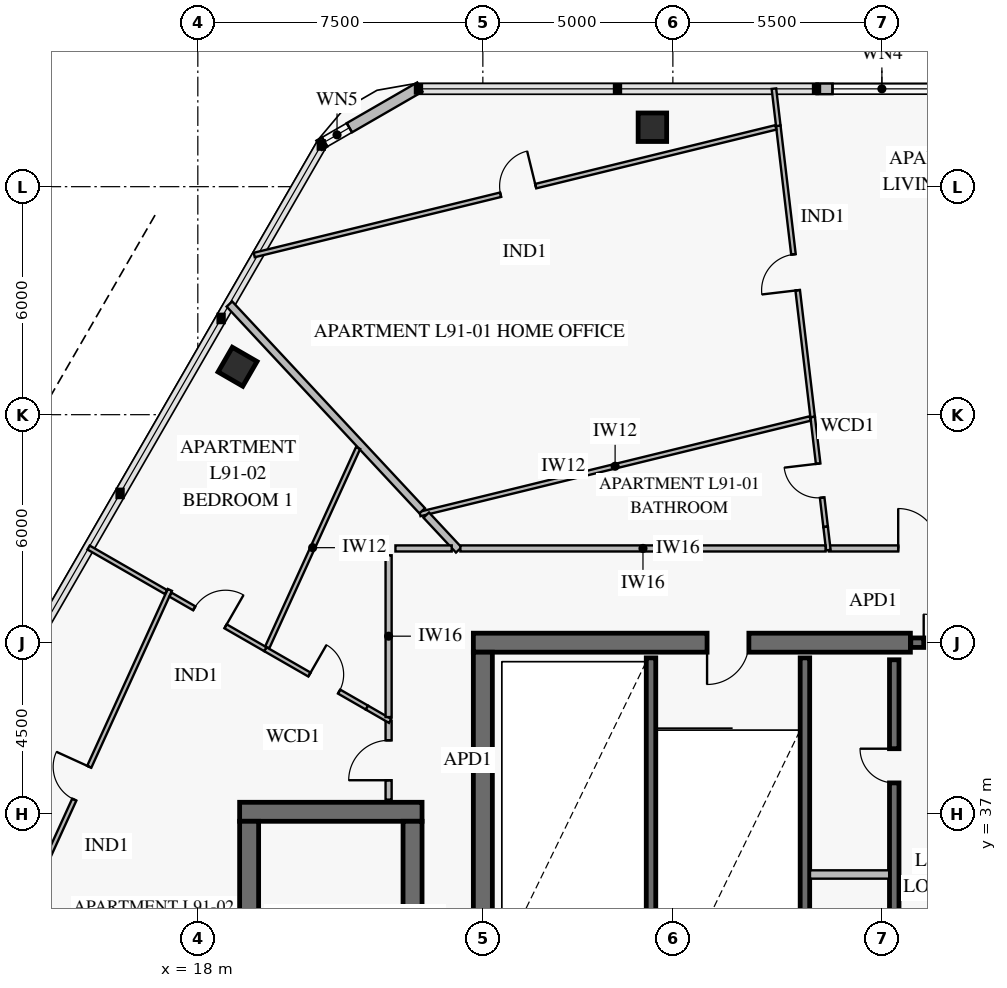
"""IFC4 building model, lengths in metres.
Left out: names, types, materials, properties, quantities, classifications, styles, units other than length and angle.
Written with IfcOpenShell. Run it as: python <this file> out.ifc"""

import sys

from ifc_helpers import new_model, si_unit, direction, frame, frame_2d, origin, origin_2d, place, context, subcontext, project, spatial, rectangle, extrude, element, fill, save


model = new_model("IFC4")
c1 = context("Model", 3, precision=1e-05, world=origin(), true_north=direction((0.0, 1.0)))
c2 = subcontext(c1, "Body", "Model", "MODEL_VIEW")
j1 = project(units=[si_unit("LENGTHUNIT", "METRE"), si_unit("PLANEANGLEUNIT", "RADIAN")], contexts=[c1])
p1 = place(None, origin())
s1 = spatial("IfcSite", under=j1, at=p1, CompositionType="ELEMENT")
p2 = place(p1, origin())
s2 = spatial("IfcBuilding", under=s1, at=p2, CompositionType="ELEMENT")
p3 = place(p2, frame((0.0, 0.0, 357.6)))
s3 = spatial("IfcBuildingStorey", under=s2, at=p3, CompositionType="ELEMENT", Elevation=357.6)
p4 = place(p3, frame((36.75, 41.5, 0.0), z_axis=(0.0, 0.0, 1.0), x_axis=(-1.0, 0.0, 0.0)))
e1 = element("IfcWall", 1, at=p4, inside=s3, PredefinedType="SHEAR", context=c2, shape_type="SweptSolid", body=[
    extrude(rectangle(XDim=11.5, YDim=0.5, at=frame_2d((5.75, 0.0))), origin(), (0.0, 0.0, 1.0), 3.8),
])
p5 = place(p4, frame((4.25, 0.0, 0.0)))
e2 = element("IfcOpeningElement", 2, at=p5, cuts=e1, PredefinedType="OPENING", context=c2, shape_type="SweptSolid", body=[
    extrude(rectangle(XDim=1.1, YDim=2.15, at=frame_2d((0.55, 1.075))), frame((0.0, 0.262, 0.0), z_axis=(0.0, -1.0, 0.0), x_axis=(1.0, 0.0, 0.0)), (0.0, 0.0, 1.0), 0.524),
])
p6 = place(p3, frame((25.5, 22.75, 0.0), z_axis=(0.0, 0.0, 1.0), x_axis=(0.0, 1.0, 0.0)))
e3 = element("IfcWall", 3, at=p6, inside=s3, PredefinedType="SHEAR", context=c2, shape_type="SweptSolid", body=[
    extrude(rectangle(XDim=18.5, YDim=0.5, at=frame_2d((9.25, 0.0))), origin(), (0.0, 0.0, 1.0), 3.8),
])
p7 = place(p6, frame((9.0, 0.0, 0.0)))
e4 = element("IfcOpeningElement", 4, at=p7, cuts=e3, PredefinedType="OPENING", context=c2, shape_type="SweptSolid", body=[
    extrude(rectangle(XDim=1.1, YDim=2.15, at=frame_2d((0.55, 1.075))), frame((0.0, 0.262, 0.0), z_axis=(0.0, -1.0, 0.0), x_axis=(1.0, 0.0, 0.0)), (0.0, 0.0, 1.0), 0.524),
])
for number, where, z_axis, x_axis in (
    (5, (29.961, 55.064, 0.0), (0.0, 0.0, 1.0), (-1.0, 0.0, 0.0)),
    (6, (19.045, 48.762, 0.0), (0.0, 0.0, 1.0), (-0.5, -0.866, 0.0)),
):
    element("IfcColumn", number, at=place(p3, frame(where, z_axis=z_axis, x_axis=x_axis)), inside=s3, PredefinedType="COLUMN", context=c2, shape_type="SweptSolid", body=[
        extrude(rectangle(XDim=0.75, YDim=0.75, at=origin_2d()), origin(), (0.0, 0.0, 1.0), 3.35),
    ])
p8 = place(p3, frame((23.9, 37.05, 0.0), z_axis=(0.0, 0.0, 1.0), x_axis=(-1.0, 0.0, 0.0)))
e7 = element("IfcWall", 7, at=p8, inside=s3, PredefinedType="SHEAR", context=c2, shape_type="SweptSolid", body=[
    extrude(rectangle(XDim=4.8, YDim=0.5, at=frame_2d((2.4, 0.0))), origin(), (0.0, 0.0, 1.0), 3.8),
])
for number, where, z_axis, x_axis in (
    (8, (19.35, 27.2, 0.0), (0.0, 0.0, 1.0), (0.0, 1.0, 0.0)),
    (9, (23.65, 36.8, 0.0), (0.0, 0.0, 1.0), (0.0, -1.0, 0.0)),
):
    element("IfcWall", number, at=place(p3, frame(where, z_axis=z_axis, x_axis=x_axis)), inside=s3, PredefinedType="SHEAR", context=c2, shape_type="SweptSolid", body=[
        extrude(rectangle(XDim=9.6, YDim=0.5, at=frame_2d((4.8, 0.0))), origin(), (0.0, 0.0, 1.0), 3.8),
    ])
p9 = place(p3, frame((21.189, 54.589, 0.0), z_axis=(0.0, 0.0, 1.0), x_axis=(0.866023752521, 0.50000286006, 0.0)))
e10 = element("IfcWall", 10, at=p9, inside=s3, PredefinedType="SOLIDWALL", context=c2, shape_type="SweptSolid", body=[
    extrude(rectangle(XDim=3.065, YDim=0.28, at=frame_2d((1.532, 0.0))), origin(), (0.0, 0.0, 1.0), 3.35),
])
p10 = place(p9, frame((0.173, 0.0, 0.85)))
e11 = element("IfcOpeningElement", 11, at=p10, cuts=e10, PredefinedType="OPENING", context=c2, shape_type="SweptSolid", body=[
    extrude(rectangle(XDim=0.75, YDim=1.5, at=frame_2d((0.375, 0.75))), frame((0.0, 0.152, 0.0), z_axis=(0.0, -1.0, 0.0), x_axis=(1.0, 0.0, 0.0)), (0.0, 0.0, 1.0), 0.304),
])
p11 = place(p3, frame((34.28, 56.074, 0.0), z_axis=(0.0, 0.0, 1.0), x_axis=(1.0, 0.0, 0.0)))
e12 = element("IfcWall", 12, at=p11, inside=s3, PredefinedType="SOLIDWALL", context=c2, shape_type="SweptSolid", body=[
    extrude(rectangle(XDim=3.44, YDim=0.28, at=frame_2d((1.72, 0.0))), origin(), (0.0, 0.0, 1.0), 3.35),
])
p12 = place(p11, frame((0.42, 0.0, 0.7)))
e13 = element("IfcOpeningElement", 13, at=p12, cuts=e12, PredefinedType="OPENING", context=c2, shape_type="SweptSolid", body=[
    extrude(rectangle(XDim=2.6, YDim=1.8, at=frame_2d((1.3, 0.9))), frame((0.0, 0.152, 0.0), z_axis=(0.0, -1.0, 0.0), x_axis=(1.0, 0.0, 0.0)), (0.0, 0.0, 1.0), 0.304),
])
p13 = place(p3, frame((36.76, 41.5, 0.0), z_axis=(0.0, 0.0, 1.0), x_axis=(1.0, 0.0, 0.0)))
e14 = element("IfcWall", 14, at=p13, inside=s3, PredefinedType="SOLIDWALL", context=c2, shape_type="SweptSolid", body=[
    extrude(rectangle(XDim=2.18, YDim=0.25, at=frame_2d((1.09, 0.0))), origin(), (0.0, 0.0, 1.0), 3.8),
])
p14 = place(p13, frame((0.34, 0.0, 0.0)))
e15 = element("IfcOpeningElement", 15, at=p14, cuts=e14, PredefinedType="OPENING", context=c2, shape_type="SweptSolid", body=[
    extrude(rectangle(XDim=1.5, YDim=2.15, at=frame_2d((0.75, 1.075))), frame((0.0, 0.137, 0.0), z_axis=(0.0, -1.0, 0.0), x_axis=(1.0, 0.0, 0.0)), (0.0, 0.0, 1.0), 0.274),
])
for number, where, z_axis, x_axis in (
    (16, (29.925, 31.4, 0.0), (0.0, 0.0, 1.0), (0.0, 1.0, 0.0)),
    (17, (33.975, 31.4, 0.0), (0.0, 0.0, 1.0), (0.0, 1.0, 0.0)),
):
    element("IfcWall", number, at=place(p3, frame(where, z_axis=z_axis, x_axis=x_axis)), inside=s3, PredefinedType="SOLIDWALL", context=c2, shape_type="SweptSolid", body=[
        extrude(rectangle(XDim=9.7, YDim=0.25, at=frame_2d((4.85, 0.0))), origin(), (0.0, 0.0, 1.0), 3.8),
    ])
p15 = place(p3, frame((36.325, 31.4, 0.0), z_axis=(0.0, 0.0, 1.0), x_axis=(0.0, 1.0, 0.0)))
e18 = element("IfcWall", 18, at=p15, inside=s3, PredefinedType="SOLIDWALL", context=c2, shape_type="SweptSolid", body=[
    extrude(rectangle(XDim=9.65, YDim=0.25, at=frame_2d((4.825, 0.0))), origin(), (0.0, 0.0, 1.0), 3.8),
])
p16 = place(p15, frame((1.49, 0.0, 0.0)))
e19 = element("IfcOpeningElement", 19, at=p16, cuts=e18, PredefinedType="OPENING", context=c2, shape_type="SweptSolid", body=[
    extrude(rectangle(XDim=0.9, YDim=2.1, at=frame_2d((0.45, 1.05))), frame((0.0, 0.137, 0.0), z_axis=(0.0, -1.0, 0.0), x_axis=(1.0, 0.0, 0.0)), (0.0, 0.0, 1.0), 0.274),
])
p17 = place(p15, frame((6.41, 0.0, 0.0)))
e20 = element("IfcOpeningElement", 20, at=p17, cuts=e18, PredefinedType="OPENING", context=c2, shape_type="SweptSolid", body=[
    extrude(rectangle(XDim=0.9, YDim=2.1, at=frame_2d((0.45, 1.05))), frame((0.0, 0.137, 0.0), z_axis=(0.0, -1.0, 0.0), x_axis=(1.0, 0.0, 0.0)), (0.0, 0.0, 1.0), 0.274),
])
p18 = place(p3, frame((34.519, 44.55, 0.0), z_axis=(0.0, 0.0, 1.0), x_axis=(-0.117167277632, 0.993112193588, 0.0)))
e21 = element("IfcWall", 21, at=p18, inside=s3, PredefinedType="PARTITIONING", context=c2, shape_type="SweptSolid", body=[
    extrude(rectangle(XDim=2.911, YDim=0.12, at=frame_2d((1.456, 0.0))), origin(), (0.0, 0.0, 1.0), 3.35),
])
p19 = place(p18, frame((0.773, 0.0, 0.0)))
e22 = element("IfcOpeningElement", 22, at=p19, cuts=e21, PredefinedType="OPENING", context=c2, shape_type="SweptSolid", body=[
    extrude(rectangle(XDim=0.9, YDim=2.1, at=frame_2d((0.45, 1.05))), frame((0.0, 0.072, 0.0), z_axis=(0.0, -1.0, 0.0), x_axis=(1.0, 0.0, 0.0)), (0.0, 0.0, 1.0), 0.144),
])
p20 = place(p3, frame((34.178, 47.441, 0.0), z_axis=(0.0, 0.0, 1.0), x_axis=(-0.11719932595, 0.993108412006, 0.0)))
e23 = element("IfcWall", 23, at=p20, inside=s3, PredefinedType="PARTITIONING", context=c2, shape_type="SweptSolid", body=[
    extrude(rectangle(XDim=7.714, YDim=0.12, at=frame_2d((3.857, 0.0))), origin(), (0.0, 0.0, 1.0), 2.77),
])
p21 = place(p20, frame((3.357, 0.0, 0.0)))
e24 = element("IfcOpeningElement", 24, at=p21, cuts=e23, PredefinedType="OPENING", context=c2, shape_type="SweptSolid", body=[
    extrude(rectangle(XDim=0.95, YDim=2.1, at=frame_2d((0.475, 1.05))), frame((0.0, 0.072, 0.0), z_axis=(0.0, -1.0, 0.0), x_axis=(1.0, 0.0, 0.0)), (0.0, 0.0, 1.0), 0.144),
])
p22 = place(p3, frame((33.21, 55.06, 0.0), z_axis=(0.0, 0.0, 1.0), x_axis=(-0.971340795698, -0.237691099145, 0.0)))
e25 = element("IfcWall", 25, at=p22, inside=s3, PredefinedType="PARTITIONING", context=c2, shape_type="SweptSolid", body=[
    extrude(rectangle(XDim=14.131, YDim=0.12, at=frame_2d((7.066, 0.0))), origin(), (0.0, 0.0, 1.0), 2.77),
])
p23 = place(p22, frame((6.506, 0.0, 0.0)))
e26 = element("IfcOpeningElement", 26, at=p23, cuts=e25, PredefinedType="OPENING", context=c2, shape_type="SweptSolid", body=[
    extrude(rectangle(XDim=0.95, YDim=2.1, at=frame_2d((0.475, 1.05))), frame((0.0, 0.072, 0.0), z_axis=(0.0, -1.0, 0.0), x_axis=(1.0, 0.0, 0.0)), (0.0, 0.0, 1.0), 0.144),
])
p24 = place(p3, frame((39.302, 43.98, 0.0), z_axis=(0.0, 0.0, 1.0), x_axis=(-1.0, 0.0, 0.0)))
e27 = element("IfcWall", 27, at=p24, inside=s3, PredefinedType="PARTITIONING", context=c2, shape_type="SweptSolid", body=[
    extrude(rectangle(XDim=4.695, YDim=0.16, at=frame_2d((2.348, 0.0))), origin(), (0.0, 0.0, 1.0), 2.8),
])
p25 = place(p24, frame((1.823, 0.0, 0.0)))
e28 = element("IfcOpeningElement", 28, at=p25, cuts=e27, PredefinedType="OPENING", context=c2, shape_type="SweptSolid", body=[
    extrude(rectangle(XDim=1.05, YDim=2.15, at=frame_2d((0.525, 1.075))), frame((0.0, 0.092, 0.0), z_axis=(0.0, -1.0, 0.0), x_axis=(1.0, 0.0, 0.0)), (0.0, 0.0, 1.0), 0.184),
])
p26 = place(p3, frame((17.264, 42.889, 0.0), z_axis=(0.0, 0.0, 1.0), x_axis=(-0.41468959687, -0.909962932348, 0.0)))
e29 = element("IfcWall", 29, at=p26, inside=s3, PredefinedType="PARTITIONING", context=c2, shape_type="SweptSolid", body=[
    extrude(rectangle(XDim=11.179, YDim=0.12, at=frame_2d((5.59, 0.0))), origin(), (0.0, 0.0, 1.0), 2.77),
])
p27 = place(p26, frame((5.115, 0.0, 0.0)))
e30 = element("IfcOpeningElement", 30, at=p27, cuts=e29, PredefinedType="OPENING", context=c2, shape_type="SweptSolid", body=[
    extrude(rectangle(XDim=0.95, YDim=2.1, at=frame_2d((0.475, 1.05))), frame((0.0, 0.072, 0.0), z_axis=(0.0, -1.0, 0.0), x_axis=(1.0, 0.0, 0.0)), (0.0, 0.0, 1.0), 0.144),
])
p28 = place(p3, frame((22.45, 39.792, 0.0), z_axis=(0.0, 0.0, 1.0), x_axis=(-0.86689518328, 0.498490462502, 0.0)))
e31 = element("IfcWall", 31, at=p28, inside=s3, PredefinedType="PARTITIONING", context=c2, shape_type="SweptSolid", body=[
    extrude(rectangle(XDim=3.083, YDim=0.12, at=frame_2d((1.542, 0.0))), origin(), (0.0, 0.0, 1.0), 3.35),
])
p29 = place(p28, frame((0.845, 0.0, 0.0)))
e32 = element("IfcOpeningElement", 32, at=p29, cuts=e31, PredefinedType="OPENING", context=c2, shape_type="SweptSolid", body=[
    extrude(rectangle(XDim=0.9, YDim=2.1, at=frame_2d((0.45, 1.05))), frame((0.0, 0.072, 0.0), z_axis=(0.0, -1.0, 0.0), x_axis=(1.0, 0.0, 0.0)), (0.0, 0.0, 1.0), 0.144),
])
p30 = place(p3, frame((19.777, 41.329, 0.0), z_axis=(0.0, 0.0, 1.0), x_axis=(-0.86688797535, 0.498502997176, 0.0)))
e33 = element("IfcWall", 33, at=p30, inside=s3, PredefinedType="PARTITIONING", context=c2, shape_type="SweptSolid", body=[
    extrude(rectangle(XDim=2.878, YDim=0.12, at=frame_2d((1.439, 0.0))), origin(), (0.0, 0.0, 1.0), 3.35),
])
p31 = place(p30, frame((1.208, 0.0, 0.0)))
e34 = element("IfcOpeningElement", 34, at=p31, cuts=e33, PredefinedType="OPENING", context=c2, shape_type="SweptSolid", body=[
    extrude(rectangle(XDim=0.95, YDim=2.1, at=frame_2d((0.475, 1.05))), frame((0.0, 0.072, 0.0), z_axis=(0.0, -1.0, 0.0), x_axis=(1.0, 0.0, 0.0)), (0.0, 0.0, 1.0), 0.144),
])
p32 = place(p3, frame((17.163, 42.832, 0.0), z_axis=(0.0, 0.0, 1.0), x_axis=(-0.866878245801, 0.498519916309, 0.0)))
e35 = element("IfcWall", 35, at=p32, inside=s3, PredefinedType="PARTITIONING", context=c2, shape_type="SweptSolid", body=[
    extrude(rectangle(XDim=2.35, YDim=0.12, at=frame_2d((1.175, 0.0))), origin(), (0.0, 0.0, 1.0), 2.77),
])
p33 = place(p3, frame((23.02, 39.441, 0.0), z_axis=(0.0, 0.0, 1.0), x_axis=(0.0, -1.0, 0.0)))
e36 = element("IfcWall", 36, at=p33, inside=s3, PredefinedType="PARTITIONING", context=c2, shape_type="SweptSolid", body=[
    extrude(rectangle(XDim=2.071, YDim=0.16, at=frame_2d((1.035, 0.0))), origin(), (0.0, 0.0, 1.0), 3.35),
])
p34 = place(p33, frame((0.51, 0.0, 0.0)))
e37 = element("IfcOpeningElement", 37, at=p34, cuts=e36, PredefinedType="OPENING", context=c2, shape_type="SweptSolid", body=[
    extrude(rectangle(XDim=1.05, YDim=2.15, at=frame_2d((0.525, 1.075))), frame((0.0, 0.092, 0.0), z_axis=(0.0, -1.0, 0.0), x_axis=(1.0, 0.0, 0.0)), (0.0, 0.0, 1.0), 0.184),
])
p35 = place(p3, frame((34.108, 35.4, 0.0), z_axis=(0.0, 0.0, 1.0), x_axis=(1.0, 0.0, 0.0)))
e38 = element("IfcWall", 38, at=p35, inside=s3, PredefinedType="PARTITIONING", context=c2, shape_type="SweptSolid", body=[
    extrude(rectangle(XDim=2.084, YDim=0.22, at=frame_2d((1.042, 0.0))), origin(), (0.0, 0.0, 1.0), 3.35),
])
p36 = place(p3, frame((34.592, 43.935, 0.0), z_axis=(0.0, 0.0, 1.0), x_axis=(-0.117138729821, 0.993115561239, 0.0)))
e39 = element("IfcWall", 39, at=p36, inside=s3, PredefinedType="PARTITIONING", context=c2, shape_type="SweptSolid", body=[
    extrude(rectangle(XDim=0.619, YDim=0.12, at=frame_2d((0.31, 0.0))), origin(), (0.0, 0.0, 1.0), 3.35),
])
p37 = place(p3, frame((33.274, 55.102, 0.0), z_axis=(0.0, 0.0, 1.0), x_axis=(-0.117071500169, 0.99312348872, 0.0)))
e40 = element("IfcWall", 40, at=p37, inside=s3, PredefinedType="PARTITIONING", context=c2, shape_type="SweptSolid", body=[
    extrude(rectangle(XDim=0.984, YDim=0.12, at=frame_2d((0.492, 0.0))), origin(), (0.0, 0.0, 1.0), 2.77),
])
p38 = place(p3, frame((34.114, 47.4, 0.0), z_axis=(0.0, 0.0, 1.0), x_axis=(-0.97134085317, -0.237690864282, 0.0)))
e41 = element("IfcWall", 41, at=p38, inside=s3, PredefinedType="PARTITIONING", context=c2, shape_type="SweptSolid", body=[
    extrude(rectangle(XDim=10.571, YDim=0.12, at=frame_2d((5.286, 0.0))), origin(), (0.0, 0.0, 1.0), 2.8),
])
p39 = place(p3, frame((24.866, 43.94, 0.0), z_axis=(0.0, 0.0, 1.0), x_axis=(-0.68185345298, 0.731488802826, 0.0)))
e42 = element("IfcWall", 42, at=p39, inside=s3, PredefinedType="PARTITIONING", context=c2, shape_type="SweptSolid", body=[
    extrude(rectangle(XDim=1.254, YDim=0.2, at=frame_2d((0.627, 0.0))), origin(), (0.0, 0.0, 1.0), 3.35),
])
p40 = place(p3, frame((23.904, 44.971, 0.0), z_axis=(0.0, 0.0, 1.0), x_axis=(-0.681993072999, 0.73135863185, 0.0)))
e43 = element("IfcWall", 43, at=p40, inside=s3, PredefinedType="PARTITIONING", context=c2, shape_type="SweptSolid", body=[
    extrude(rectangle(XDim=7.438, YDim=0.2, at=frame_2d((3.719, 0.0))), origin(), (0.0, 0.0, 1.0), 2.77),
])
p41 = place(p3, frame((23.06, 39.441, 0.0), z_axis=(0.0, 0.0, 1.0), x_axis=(-0.867044954431, 0.498229913791, 0.0)))
e44 = element("IfcWall", 44, at=p41, inside=s3, PredefinedType="PARTITIONING", context=c2, shape_type="SweptSolid", body=[
    extrude(rectangle(XDim=0.704, YDim=0.12, at=frame_2d((0.352, 0.0))), origin(), (0.0, 0.0, 1.0), 3.35),
])
p42 = place(p3, frame((22.217, 46.622, 0.0), z_axis=(0.0, 0.0, 1.0), x_axis=(-0.414709230253, -0.909953984739, 0.0)))
e45 = element("IfcWall", 45, at=p42, inside=s3, PredefinedType="PARTITIONING", context=c2, shape_type="SweptSolid", body=[
    extrude(rectangle(XDim=5.763, YDim=0.12, at=frame_2d((2.881, 0.0))), origin(), (0.0, 0.0, 1.0), 2.8),
])
p43 = place(p3, frame((34.518, 43.98, 0.0), z_axis=(0.0, 0.0, 1.0), x_axis=(-1.0, 0.0, 0.0)))
e46 = element("IfcWall", 46, at=p43, inside=s3, PredefinedType="PARTITIONING", context=c2, shape_type="SweptSolid", body=[
    extrude(rectangle(XDim=9.609, YDim=0.16, at=frame_2d((4.805, 0.0))), origin(), (0.0, 0.0, 1.0), 2.8),
])
p44 = place(p3, frame((23.02, 43.8, 0.0), z_axis=(0.0, 0.0, 1.0), x_axis=(0.0, -1.0, 0.0)))
e47 = element("IfcWall", 47, at=p44, inside=s3, PredefinedType="PARTITIONING", context=c2, shape_type="SweptSolid", body=[
    extrude(rectangle(XDim=4.258, YDim=0.16, at=frame_2d((2.129, 0.0))), origin(), (0.0, 0.0, 1.0), 3.35),
])
p45 = place(p3, frame((24.681, 43.98, 0.0), z_axis=(0.0, 0.0, 1.0), x_axis=(-1.0, 0.0, 0.0)))
e48 = element("IfcWall", 48, at=p45, inside=s3, PredefinedType="PARTITIONING", context=c2, shape_type="SweptSolid", body=[
    extrude(rectangle(XDim=1.481, YDim=0.16, at=frame_2d((0.74, 0.0))), origin(), (0.0, 0.0, 1.0), 2.8),
])
p46 = place(p10, origin())
e49 = element("IfcWindow", 49, at=p46, inside=s3, PartitioningType="SINGLE_PANEL", PredefinedType="WINDOW", context=c2, shape_type="SweptSolid", body=[
    extrude(rectangle(XDim=0.75, YDim=1.5, at=frame_2d((0.375, 0.75))), frame((0.0, 0.03, 0.0), z_axis=(0.0, -1.0, 0.0), x_axis=(1.0, 0.0, 0.0)), (0.0, 0.0, 1.0), 0.06),
])
fill(e11, e49)
p47 = place(p12, origin())
e50 = element("IfcWindow", 50, at=p47, inside=s3, PartitioningType="SINGLE_PANEL", PredefinedType="WINDOW", context=c2, shape_type="SweptSolid", body=[
    extrude(rectangle(XDim=2.6, YDim=1.8, at=frame_2d((1.3, 0.9))), frame((0.0, 0.03, 0.0), z_axis=(0.0, -1.0, 0.0), x_axis=(1.0, 0.0, 0.0)), (0.0, 0.0, 1.0), 0.06),
])
fill(e13, e50)
p48 = place(p5, origin())
e51 = element("IfcDoor", 51, at=p48, inside=s3, OperationType="SINGLE_SWING_RIGHT", PredefinedType="USERDEFINED", context=c2, shape_type="SweptSolid", body=[
    extrude(rectangle(XDim=1.1, YDim=2.15, at=frame_2d((0.55, 1.075))), frame((0.0, 0.025, 0.0), z_axis=(0.0, -1.0, 0.0), x_axis=(1.0, 0.0, 0.0)), (0.0, 0.0, 1.0), 0.05),
])
fill(e2, e51)
p49 = place(p14, origin())
e52 = element("IfcDoor", 52, at=p49, inside=s3, OperationType="DOUBLE_DOOR_SINGLE_SWING", PredefinedType="DOOR", context=c2, shape_type="SweptSolid", body=[
    extrude(rectangle(XDim=1.5, YDim=2.15, at=frame_2d((0.75, 1.075))), frame((0.0, 0.025, 0.0), z_axis=(0.0, -1.0, 0.0), x_axis=(1.0, 0.0, 0.0)), (0.0, 0.0, 1.0), 0.05),
])
fill(e15, e52)
p50 = place(p17, origin())
e53 = element("IfcDoor", 53, at=p50, inside=s3, OperationType="SINGLE_SWING_RIGHT", PredefinedType="DOOR", context=c2, shape_type="SweptSolid", body=[
    extrude(rectangle(XDim=0.9, YDim=2.1, at=frame_2d((0.45, 1.05))), frame((0.0, 0.025, 0.0), z_axis=(0.0, -1.0, 0.0), x_axis=(1.0, 0.0, 0.0)), (0.0, 0.0, 1.0), 0.05),
])
fill(e20, e53)
p51 = place(p19, origin())
e54 = element("IfcDoor", 54, at=p51, inside=s3, OperationType="SINGLE_SWING_RIGHT", PredefinedType="DOOR", context=c2, shape_type="SweptSolid", body=[
    extrude(rectangle(XDim=0.9, YDim=2.1, at=frame_2d((0.45, 1.05))), frame((0.0, 0.025, 0.0), z_axis=(0.0, -1.0, 0.0), x_axis=(1.0, 0.0, 0.0)), (0.0, 0.0, 1.0), 0.05),
])
fill(e22, e54)
p52 = place(p21, origin())
e55 = element("IfcDoor", 55, at=p52, inside=s3, OperationType="SINGLE_SWING_LEFT", PredefinedType="DOOR", context=c2, shape_type="SweptSolid", body=[
    extrude(rectangle(XDim=0.95, YDim=2.1, at=frame_2d((0.475, 1.05))), frame((0.0, 0.025, 0.0), z_axis=(0.0, -1.0, 0.0), x_axis=(1.0, 0.0, 0.0)), (0.0, 0.0, 1.0), 0.05),
])
fill(e24, e55)
p53 = place(p23, frame((0.95, 0.0, 0.0), z_axis=(0.0, 0.0, 1.0), x_axis=(-1.0, 0.0, 0.0)))
e56 = element("IfcDoor", 56, at=p53, inside=s3, OperationType="SINGLE_SWING_RIGHT", PredefinedType="DOOR", context=c2, shape_type="SweptSolid", body=[
    extrude(rectangle(XDim=0.95, YDim=2.1, at=frame_2d((0.475, 1.05))), frame((0.0, 0.025, 0.0), z_axis=(0.0, -1.0, 0.0), x_axis=(1.0, 0.0, 0.0)), (0.0, 0.0, 1.0), 0.05),
])
fill(e26, e56)
p54 = place(p25, frame((1.05, 0.0, 0.0), z_axis=(0.0, 0.0, 1.0), x_axis=(-1.0, 0.0, 0.0)))
e57 = element("IfcDoor", 57, at=p54, inside=s3, OperationType="SINGLE_SWING_LEFT", PredefinedType="DOOR", context=c2, shape_type="SweptSolid", body=[
    extrude(rectangle(XDim=1.05, YDim=2.15, at=frame_2d((0.525, 1.075))), frame((0.0, 0.025, 0.0), z_axis=(0.0, -1.0, 0.0), x_axis=(1.0, 0.0, 0.0)), (0.0, 0.0, 1.0), 0.05),
])
fill(e28, e57)
p55 = place(p27, frame((0.95, 0.0, 0.0), z_axis=(0.0, 0.0, 1.0), x_axis=(-1.0, 0.0, 0.0)))
e58 = element("IfcDoor", 58, at=p55, inside=s3, OperationType="SINGLE_SWING_RIGHT", PredefinedType="DOOR", context=c2, shape_type="SweptSolid", body=[
    extrude(rectangle(XDim=0.95, YDim=2.1, at=frame_2d((0.475, 1.05))), frame((0.0, 0.025, 0.0), z_axis=(0.0, -1.0, 0.0), x_axis=(1.0, 0.0, 0.0)), (0.0, 0.0, 1.0), 0.05),
])
fill(e30, e58)
p56 = place(p29, frame((0.9, 0.0, 0.0), z_axis=(0.0, 0.0, 1.0), x_axis=(-1.0, 0.0, 0.0)))
e59 = element("IfcDoor", 59, at=p56, inside=s3, OperationType="SINGLE_SWING_LEFT", PredefinedType="DOOR", context=c2, shape_type="SweptSolid", body=[
    extrude(rectangle(XDim=0.9, YDim=2.1, at=frame_2d((0.45, 1.05))), frame((0.0, 0.025, 0.0), z_axis=(0.0, -1.0, 0.0), x_axis=(1.0, 0.0, 0.0)), (0.0, 0.0, 1.0), 0.05),
])
fill(e32, e59)
p57 = place(p31, frame((0.95, 0.0, 0.0), z_axis=(0.0, 0.0, 1.0), x_axis=(-1.0, 0.0, 0.0)))
e60 = element("IfcDoor", 60, at=p57, inside=s3, OperationType="SINGLE_SWING_RIGHT", PredefinedType="DOOR", context=c2, shape_type="SweptSolid", body=[
    extrude(rectangle(XDim=0.95, YDim=2.1, at=frame_2d((0.475, 1.05))), frame((0.0, 0.025, 0.0), z_axis=(0.0, -1.0, 0.0), x_axis=(1.0, 0.0, 0.0)), (0.0, 0.0, 1.0), 0.05),
])
fill(e34, e60)
p58 = place(p34, frame((1.05, 0.0, 0.0), z_axis=(0.0, 0.0, 1.0), x_axis=(-1.0, 0.0, 0.0)))
e61 = element("IfcDoor", 61, at=p58, inside=s3, OperationType="SINGLE_SWING_LEFT", PredefinedType="DOOR", context=c2, shape_type="SweptSolid", body=[
    extrude(rectangle(XDim=1.05, YDim=2.15, at=frame_2d((0.525, 1.075))), frame((0.0, 0.025, 0.0), z_axis=(0.0, -1.0, 0.0), x_axis=(1.0, 0.0, 0.0)), (0.0, 0.0, 1.0), 0.05),
])
fill(e37, e61)
save(model, sys.argv[1])
